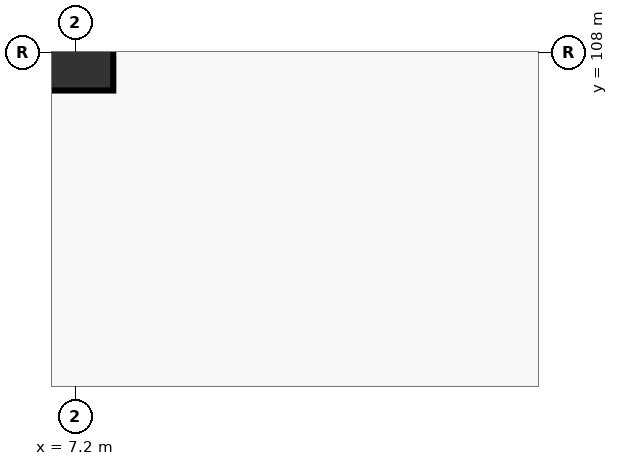
"""IFC4 building model, lengths in metres.
Left out: names, types, materials, properties, quantities, classifications, styles, units other than length and angle.
Written with IfcOpenShell. Run it as: python <this file> out.ifc"""

import sys

from ifc_helpers import new_model, si_unit, direction, frame, origin, origin_2d, place, context, subcontext, project, spatial, rectangle, extrude, element, save


model = new_model("IFC4")
c1 = context("Model", 3, precision=1e-05, world=origin(), true_north=direction((0.0, 1.0)))
c2 = subcontext(c1, "Body", "Model", "MODEL_VIEW")
j1 = project(units=[si_unit("LENGTHUNIT", "METRE"), si_unit("PLANEANGLEUNIT", "RADIAN")], contexts=[c1])
p1 = place(None, origin())
s1 = spatial("IfcSite", under=j1, at=p1, CompositionType="ELEMENT")
p2 = place(p1, origin())
s2 = spatial("IfcBuilding", under=s1, at=p2, CompositionType="ELEMENT")
p3 = place(p2, frame((0.0, 0.0, -5.4)))
s3 = spatial("IfcBuildingStorey", under=s2, at=p3, CompositionType="ELEMENT", Elevation=-5.4)
p4 = place(p3, frame((7.2, 108.0, 0.0), z_axis=(0.0, 0.0, 1.0), x_axis=(1.0, 0.0, 0.0)))
e1 = element("IfcColumn", 1, at=p4, inside=s3, PredefinedType="COLUMN", context=c2, shape_type="SweptSolid", body=[
    extrude(rectangle(XDim=1.0, YDim=1.0, at=origin_2d()), origin(), (0.0, 0.0, 1.0), 5.4),
])
save(model, sys.argv[1])
